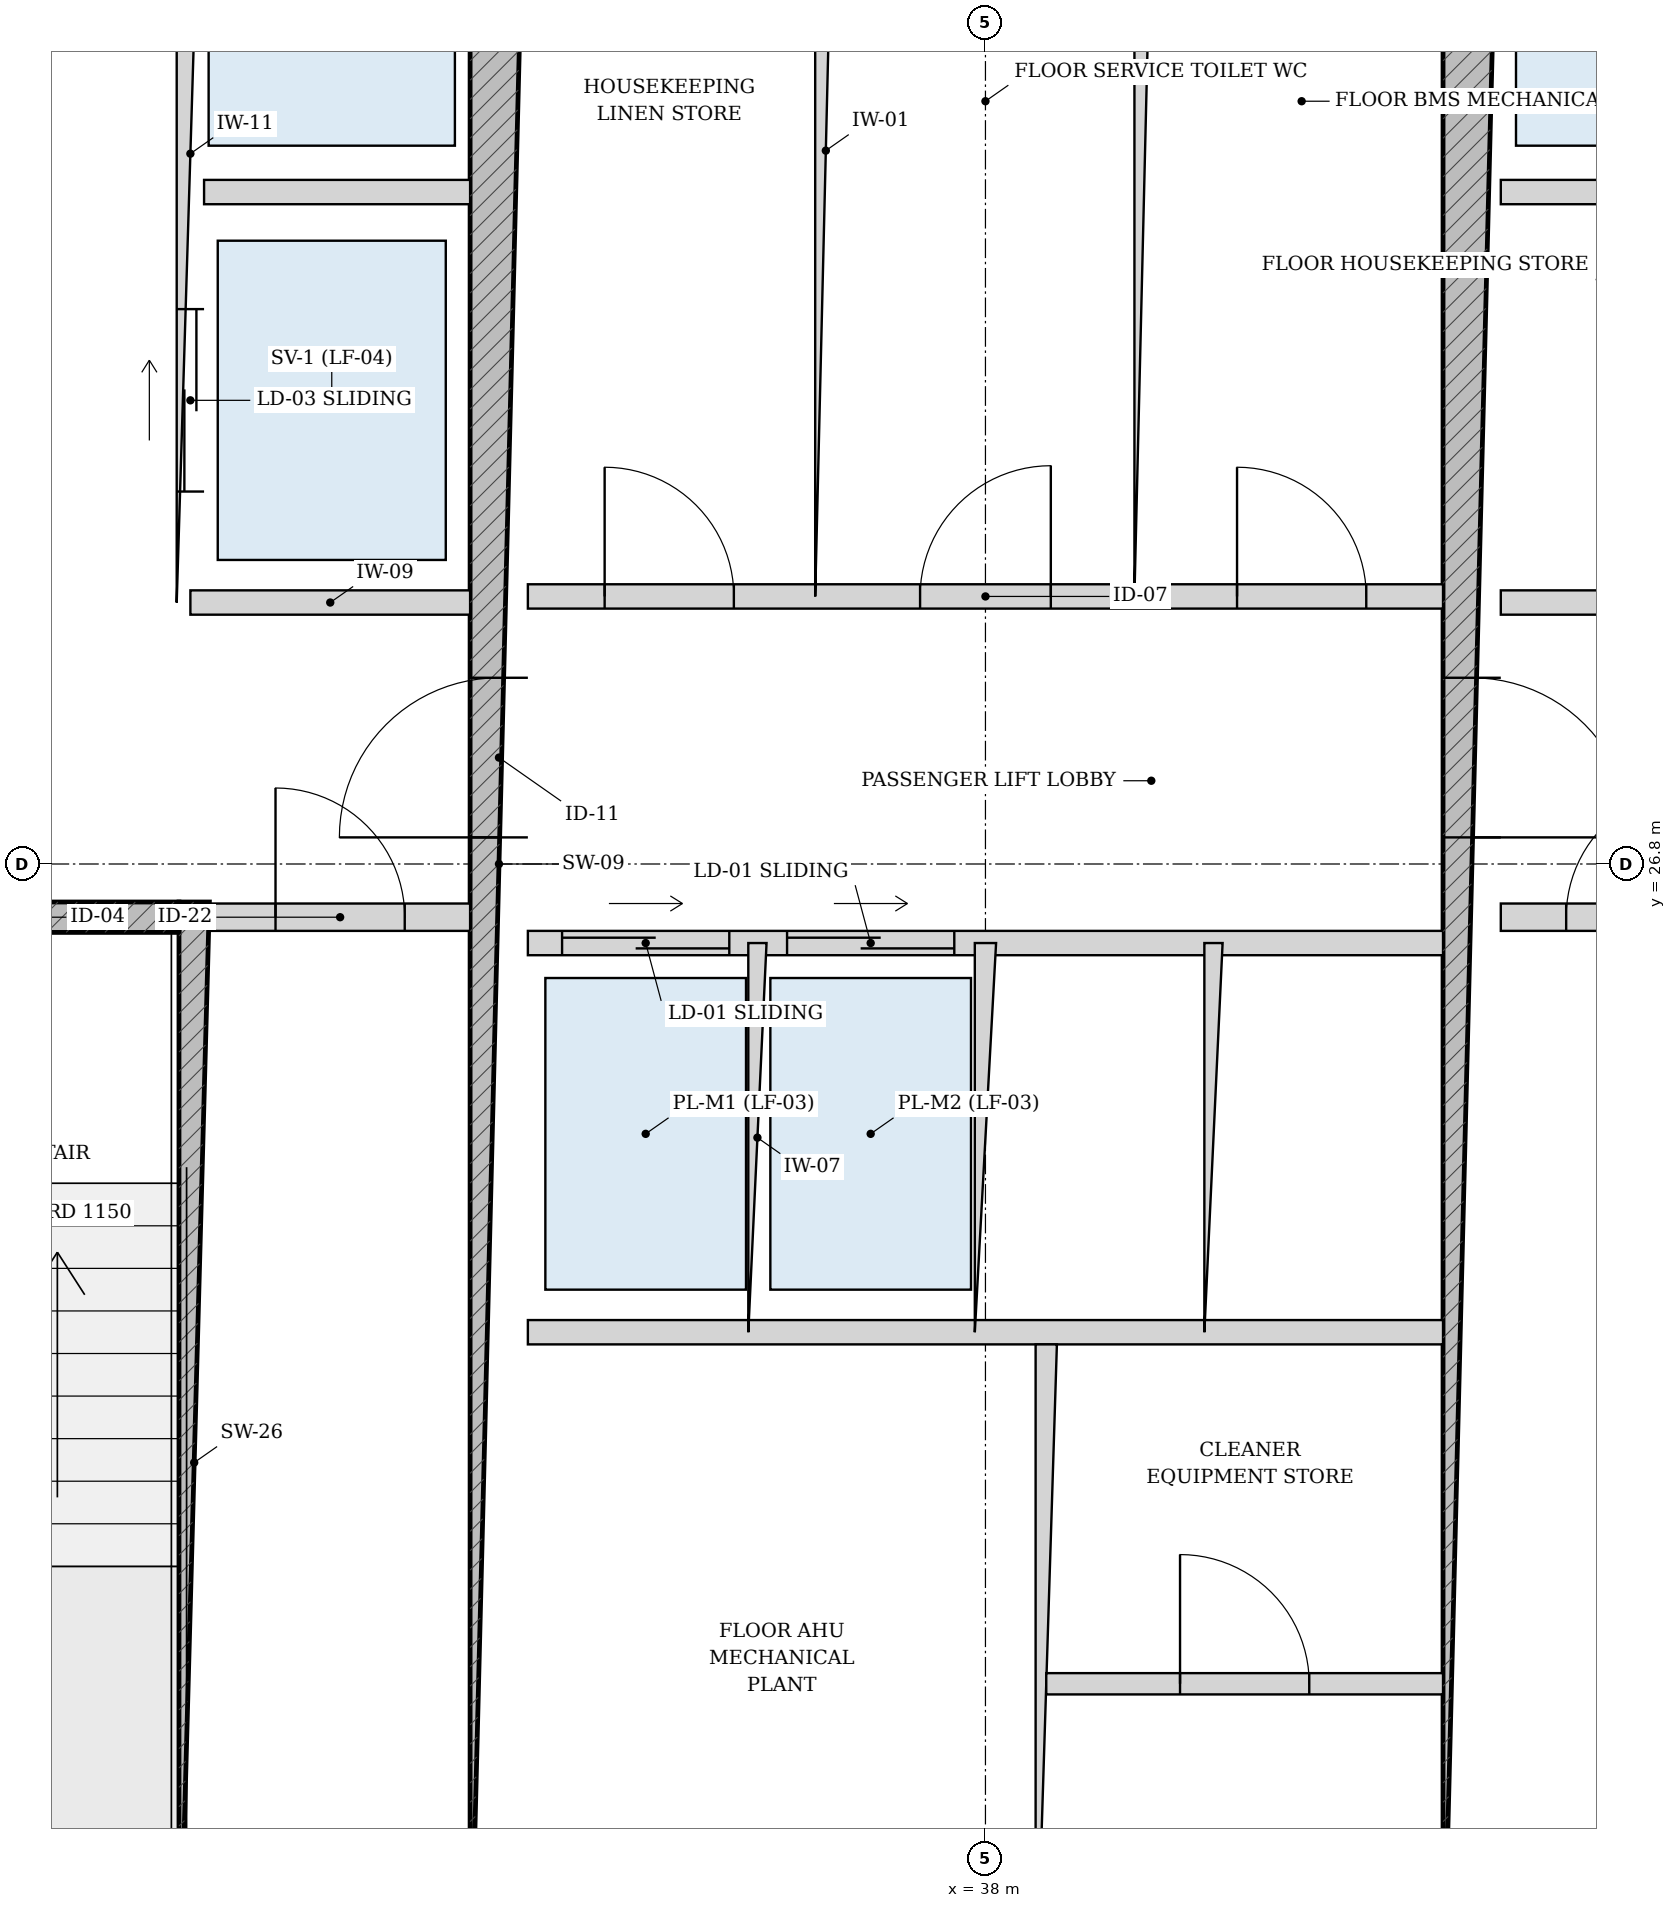
"""IFC4 building model, lengths in metres.
Left out: names, types, materials, properties, quantities, classifications, styles, units other than length and angle.
Written with IfcOpenShell. Run it as: python <this file> out.ifc"""

import sys

from ifc_helpers import new_model, si_unit, direction, frame, frame_2d, origin, place, context, subcontext, project, spatial, rectangle, extrude, source, transform, mapped, element, fill, save


model = new_model("IFC4")
c1 = context("Model", 3, precision=1e-05, world=origin(), true_north=direction((-0.2419218956, 0.970295726276)))
c2 = subcontext(c1, "Body", "Model", "MODEL_VIEW")
j1 = project(units=[si_unit("LENGTHUNIT", "METRE"), si_unit("PLANEANGLEUNIT", "RADIAN")], contexts=[c1])
p1 = place(None, origin())
s1 = spatial("IfcSite", under=j1, at=p1, CompositionType="ELEMENT")
p2 = place(p1, origin())
s2 = spatial("IfcBuilding", under=s1, at=p2, CompositionType="ELEMENT")
p3 = place(p2, frame((0.0, 0.0, 146.2)))
s3 = spatial("IfcBuildingStorey", under=s2, at=p3, CompositionType="ELEMENT", Elevation=146.2)
p4 = place(p3, frame((32.795, 19.175, 0.0), z_axis=(0.0, 0.0, 1.0), x_axis=(0.0, 1.0, 0.0)))
e1 = element("IfcWall", 1, at=p4, inside=s3, PredefinedType="SOLIDWALL", context=c2, shape_type="SweptSolid", body=[
    extrude(rectangle(XDim=7.375, YDim=0.2, at=frame_2d((3.688, 0.0))), origin(), (0.0, 0.0, 1.0), 3.33),
])
p5 = place(p3, frame((29.375, 26.45, 0.0), z_axis=(0.0, 0.0, 1.0), x_axis=(1.0, 0.0, 0.0)))
e2 = element("IfcWall", 2, at=p5, inside=s3, PredefinedType="SOLIDWALL", context=c2, shape_type="SweptSolid", body=[
    extrude(rectangle(XDim=3.32, YDim=0.2, at=frame_2d((1.66, 0.0))), origin(), (0.0, 0.0, 1.0), 3.33),
])
p6 = place(p5, frame((1.185, 0.0, 0.0)))
e3 = element("IfcOpeningElement", 3, at=p6, cuts=e2, PredefinedType="OPENING", context=c2, shape_type="SweptSolid", body=[
    extrude(rectangle(XDim=0.95, YDim=2.15, at=frame_2d((0.475, 1.075))), frame((0.0, 0.11, 0.0), z_axis=(0.0, -1.0, 0.0), x_axis=(1.0, 0.0, 0.0)), (0.0, 0.0, 1.0), 0.22),
])
p7 = place(p3, frame((34.8, 19.175, 0.0), z_axis=(0.0, 0.0, 1.0), x_axis=(0.0, 1.0, 0.0)))
e4 = element("IfcWall", 4, at=p7, inside=s3, PredefinedType="SHEAR", context=c2, shape_type="SweptSolid", body=[
    extrude(rectangle(XDim=15.25, YDim=0.38, at=frame_2d((7.625, 0.0))), origin(), (0.0, 0.0, 1.0), 3.33),
])
p8 = place(p7, frame((7.8, 0.0, 0.0)))
e5 = element("IfcOpeningElement", 5, at=p8, cuts=e4, PredefinedType="OPENING", context=c2, shape_type="SweptSolid", body=[
    extrude(rectangle(XDim=1.05, YDim=2.15, at=frame_2d((0.525, 1.075))), frame((0.0, 0.2, 0.0), z_axis=(0.0, -1.0, 0.0), x_axis=(1.0, 0.0, 0.0)), (0.0, 0.0, 1.0), 0.4),
])
p9 = place(p3, frame((41.2, 19.175, 0.0), z_axis=(0.0, 0.0, 1.0), x_axis=(0.0, 1.0, 0.0)))
e6 = element("IfcWall", 6, at=p9, inside=s3, PredefinedType="SHEAR", context=c2, shape_type="SweptSolid", body=[
    extrude(rectangle(XDim=15.25, YDim=0.38, at=frame_2d((7.625, 0.0))), origin(), (0.0, 0.0, 1.0), 3.33),
])
p10 = place(p9, frame((7.8, 0.0, 0.0)))
e7 = element("IfcOpeningElement", 7, at=p10, cuts=e6, PredefinedType="OPENING", context=c2, shape_type="SweptSolid", body=[
    extrude(rectangle(XDim=1.05, YDim=2.15, at=frame_2d((0.525, 1.075))), frame((0.0, 0.2, 0.0), z_axis=(0.0, -1.0, 0.0), x_axis=(1.0, 0.0, 0.0)), (0.0, 0.0, 1.0), 0.4),
])
p11 = place(p3, frame((32.9, 26.45, 0.0), z_axis=(0.0, 0.0, 1.0), x_axis=(1.0, 0.0, 0.0)))
e8 = element("IfcWall", 8, at=p11, inside=s3, PredefinedType="PARTITIONING", context=c2, shape_type="SweptSolid", body=[
    extrude(rectangle(XDim=1.71, YDim=0.18, at=frame_2d((0.855, 0.0))), origin(), (0.0, 0.0, 1.0), 3.33),
])
p12 = place(p11, frame((0.43, 0.0, 0.0)))
e9 = element("IfcOpeningElement", 9, at=p12, cuts=e8, PredefinedType="OPENING", context=c2, shape_type="SweptSolid", body=[
    extrude(rectangle(XDim=0.85, YDim=2.1, at=frame_2d((0.425, 1.05))), frame((0.0, 0.1, 0.0), z_axis=(0.0, -1.0, 0.0), x_axis=(1.0, 0.0, 0.0)), (0.0, 0.0, 1.0), 0.2),
])
p13 = place(p3, frame((41.39, 26.45, 0.0), z_axis=(0.0, 0.0, 1.0), x_axis=(1.0, 0.0, 0.0)))
e10 = element("IfcWall", 10, at=p13, inside=s3, PredefinedType="PARTITIONING", context=c2, shape_type="SweptSolid", body=[
    extrude(rectangle(XDim=1.71, YDim=0.18, at=frame_2d((0.855, 0.0))), origin(), (0.0, 0.0, 1.0), 3.33),
])
p14 = place(p13, frame((0.43, 0.0, 0.0)))
e11 = element("IfcOpeningElement", 11, at=p14, cuts=e10, PredefinedType="OPENING", context=c2, shape_type="SweptSolid", body=[
    extrude(rectangle(XDim=0.85, YDim=2.1, at=frame_2d((0.425, 1.05))), frame((0.0, 0.1, 0.0), z_axis=(0.0, -1.0, 0.0), x_axis=(1.0, 0.0, 0.0)), (0.0, 0.0, 1.0), 0.2),
])
p15 = place(p3, frame((32.77, 28.52, 0.0), z_axis=(0.0, 0.0, 1.0), x_axis=(0.0, 1.0, 0.0)))
e12 = element("IfcWall", 12, at=p15, inside=s3, PredefinedType="PARTITIONING", context=c2, shape_type="SweptSolid", body=[
    extrude(rectangle(XDim=5.905, YDim=0.18, at=frame_2d((2.953, 0.0))), origin(), (0.0, 0.0, 1.0), 3.33),
])
p16 = place(p15, frame((3.655, 0.0, 0.0)))
e13 = element("IfcOpeningElement", 13, at=p16, cuts=e12, PredefinedType="OPENING", context=c2, shape_type="SweptSolid", body=[
    extrude(rectangle(XDim=1.15, YDim=2.2, at=frame_2d((0.575, 1.1))), frame((0.0, 0.1, 0.0), z_axis=(0.0, -1.0, 0.0), x_axis=(1.0, 0.0, 0.0)), (0.0, 0.0, 1.0), 0.2),
])
p17 = place(p15, frame((0.73, 0.0, 0.0)))
e14 = element("IfcOpeningElement", 14, at=p17, cuts=e12, PredefinedType="OPENING", context=c2, shape_type="SweptSolid", body=[
    extrude(rectangle(XDim=1.2, YDim=2.25, at=frame_2d((0.6, 1.125))), frame((0.0, 0.1, 0.0), z_axis=(0.0, -1.0, 0.0), x_axis=(1.0, 0.0, 0.0)), (0.0, 0.0, 1.0), 0.2),
])
p18 = place(p3, frame((32.86, 31.22, 0.0), z_axis=(0.0, 0.0, 1.0), x_axis=(1.0, 0.0, 0.0)))
e15 = element("IfcWall", 15, at=p18, inside=s3, PredefinedType="PARTITIONING", context=c2, shape_type="SweptSolid", body=[
    extrude(rectangle(XDim=1.75, YDim=0.16, at=frame_2d((0.875, 0.0))), origin(), (0.0, 0.0, 1.0), 3.33),
])
p19 = place(p3, frame((32.77, 28.52, 0.0), z_axis=(0.0, 0.0, 1.0), x_axis=(1.0, 0.0, 0.0)))
e16 = element("IfcWall", 16, at=p19, inside=s3, PredefinedType="PARTITIONING", context=c2, shape_type="SweptSolid", body=[
    extrude(rectangle(XDim=1.84, YDim=0.16, at=frame_2d((0.92, 0.0))), origin(), (0.0, 0.0, 1.0), 3.33),
])
p20 = place(p3, frame((41.39, 31.22, 0.0), z_axis=(0.0, 0.0, 1.0), x_axis=(1.0, 0.0, 0.0)))
e17 = element("IfcWall", 17, at=p20, inside=s3, PredefinedType="PARTITIONING", context=c2, shape_type="SweptSolid", body=[
    extrude(rectangle(XDim=1.75, YDim=0.16, at=frame_2d((0.875, 0.0))), origin(), (0.0, 0.0, 1.0), 3.33),
])
p21 = place(p3, frame((41.39, 28.52, 0.0), z_axis=(0.0, 0.0, 1.0), x_axis=(1.0, 0.0, 0.0)))
e18 = element("IfcWall", 18, at=p21, inside=s3, PredefinedType="PARTITIONING", context=c2, shape_type="SweptSolid", body=[
    extrude(rectangle(XDim=1.84, YDim=0.16, at=frame_2d((0.92, 0.0))), origin(), (0.0, 0.0, 1.0), 3.33),
])
p22 = place(p3, frame((34.99, 28.56, 0.0), z_axis=(0.0, 0.0, 1.0), x_axis=(1.0, 0.0, 0.0)))
e19 = element("IfcWall", 19, at=p22, inside=s3, PredefinedType="PARTITIONING", context=c2, shape_type="SweptSolid", body=[
    extrude(rectangle(XDim=6.02, YDim=0.16, at=frame_2d((3.01, 0.0))), origin(), (0.0, 0.0, 1.0), 3.33),
])
p23 = place(p22, frame((0.505, 0.0, 0.0)))
e20 = element("IfcOpeningElement", 20, at=p23, cuts=e19, PredefinedType="OPENING", context=c2, shape_type="SweptSolid", body=[
    extrude(rectangle(XDim=0.85, YDim=2.1, at=frame_2d((0.425, 1.05))), frame((0.0, 0.09, 0.0), z_axis=(0.0, -1.0, 0.0), x_axis=(1.0, 0.0, 0.0)), (0.0, 0.0, 1.0), 0.18),
])
p24 = place(p22, frame((2.58, 0.0, 0.0)))
e21 = element("IfcOpeningElement", 21, at=p24, cuts=e19, PredefinedType="OPENING", context=c2, shape_type="SweptSolid", body=[
    extrude(rectangle(XDim=0.86, YDim=2.1, at=frame_2d((0.43, 1.05))), frame((0.0, 0.09, 0.0), z_axis=(0.0, -1.0, 0.0), x_axis=(1.0, 0.0, 0.0)), (0.0, 0.0, 1.0), 0.18),
])
p25 = place(p22, frame((4.665, 0.0, 0.0)))
e22 = element("IfcOpeningElement", 22, at=p25, cuts=e19, PredefinedType="OPENING", context=c2, shape_type="SweptSolid", body=[
    extrude(rectangle(XDim=0.85, YDim=2.1, at=frame_2d((0.425, 1.05))), frame((0.0, 0.09, 0.0), z_axis=(0.0, -1.0, 0.0), x_axis=(1.0, 0.0, 0.0)), (0.0, 0.0, 1.0), 0.18),
])
for number, where, z_axis, x_axis in (
    (23, (36.95, 28.56, 0.0), (0.0, 0.0, 1.0), (0.0, 1.0, 0.0)),
    (24, (39.05, 28.56, 0.0), (0.0, 0.0, 1.0), (0.0, 1.0, 0.0)),
):
    element("IfcWall", number, at=place(p3, frame(where, z_axis=z_axis, x_axis=x_axis)), inside=s3, PredefinedType="PARTITIONING", context=c2, shape_type="SweptSolid", body=[
        extrude(rectangle(XDim=5.865, YDim=0.14, at=frame_2d((2.933, 0.0))), origin(), (0.0, 0.0, 1.0), 3.33),
    ])
p26 = place(p3, frame((34.99, 26.28, 0.0), z_axis=(0.0, 0.0, 1.0), x_axis=(1.0, 0.0, 0.0)))
e25 = element("IfcWall", 25, at=p26, inside=s3, PredefinedType="PARTITIONING", context=c2, shape_type="SweptSolid", body=[
    extrude(rectangle(XDim=6.02, YDim=0.16, at=frame_2d((3.01, 0.0))), origin(), (0.0, 0.0, 1.0), 3.33),
])
p27 = place(p26, frame((0.225, 0.0, 0.0)))
e26 = element("IfcOpeningElement", 26, at=p27, cuts=e25, PredefinedType="OPENING", context=c2, shape_type="SweptSolid", body=[
    extrude(rectangle(XDim=1.1, YDim=2.2, at=frame_2d((0.55, 1.1))), frame((0.0, 0.09, 0.0), z_axis=(0.0, -1.0, 0.0), x_axis=(1.0, 0.0, 0.0)), (0.0, 0.0, 1.0), 0.18),
])
p28 = place(p26, frame((1.705, 0.0, 0.0)))
e27 = element("IfcOpeningElement", 27, at=p28, cuts=e25, PredefinedType="OPENING", context=c2, shape_type="SweptSolid", body=[
    extrude(rectangle(XDim=1.1, YDim=2.2, at=frame_2d((0.55, 1.1))), frame((0.0, 0.09, 0.0), z_axis=(0.0, -1.0, 0.0), x_axis=(1.0, 0.0, 0.0)), (0.0, 0.0, 1.0), 0.18),
])
p29 = place(p3, frame((34.99, 23.72, 0.0), z_axis=(0.0, 0.0, 1.0), x_axis=(1.0, 0.0, 0.0)))
e28 = element("IfcWall", 28, at=p29, inside=s3, PredefinedType="PARTITIONING", context=c2, shape_type="SweptSolid", body=[
    extrude(rectangle(XDim=6.02, YDim=0.16, at=frame_2d((3.01, 0.0))), origin(), (0.0, 0.0, 1.0), 3.33),
])
p30 = place(p3, frame((36.5, 23.72, 0.0), z_axis=(0.0, 0.0, 1.0), x_axis=(0.0, 1.0, 0.0)))
e29 = element("IfcWall", 29, at=p30, inside=s3, PredefinedType="PARTITIONING", context=c2, shape_type="SweptSolid", body=[
    extrude(rectangle(XDim=2.56, YDim=0.12, at=frame_2d((1.28, 0.0))), origin(), (0.0, 0.0, 1.0), 3.33),
])
p31 = place(p3, frame((38.0, 23.72, 0.0), z_axis=(0.0, 0.0, 1.0), x_axis=(0.0, 1.0, 0.0)))
e30 = element("IfcWall", 30, at=p31, inside=s3, PredefinedType="PARTITIONING", context=c2, shape_type="SweptSolid", body=[
    extrude(rectangle(XDim=2.56, YDim=0.14, at=frame_2d((1.28, 0.0))), origin(), (0.0, 0.0, 1.0), 3.33),
])
p32 = place(p3, frame((39.5, 23.72, 0.0), z_axis=(0.0, 0.0, 1.0), x_axis=(0.0, 1.0, 0.0)))
e31 = element("IfcWall", 31, at=p32, inside=s3, PredefinedType="PARTITIONING", context=c2, shape_type="SweptSolid", body=[
    extrude(rectangle(XDim=2.56, YDim=0.12, at=frame_2d((1.28, 0.0))), origin(), (0.0, 0.0, 1.0), 3.33),
])
p33 = place(p3, frame((38.4, 19.175, 0.0), z_axis=(0.0, 0.0, 1.0), x_axis=(0.0, 1.0, 0.0)))
e32 = element("IfcWall", 32, at=p33, inside=s3, PredefinedType="PARTITIONING", context=c2, shape_type="SweptSolid", body=[
    extrude(rectangle(XDim=4.465, YDim=0.14, at=frame_2d((2.232, 0.0))), origin(), (0.0, 0.0, 1.0), 3.33),
])
p34 = place(p3, frame((38.4, 21.407, 0.0), z_axis=(0.0, 0.0, 1.0), x_axis=(1.0, 0.0, 0.0)))
e33 = element("IfcWall", 33, at=p34, inside=s3, PredefinedType="PARTITIONING", context=c2, shape_type="SweptSolid", body=[
    extrude(rectangle(XDim=2.61, YDim=0.14, at=frame_2d((1.305, 0.0))), origin(), (0.0, 0.0, 1.0), 3.33),
])
p35 = place(p34, frame((0.88, 0.0, 0.0)))
e34 = element("IfcOpeningElement", 34, at=p35, cuts=e33, PredefinedType="OPENING", context=c2, shape_type="SweptSolid", body=[
    extrude(rectangle(XDim=0.85, YDim=2.1, at=frame_2d((0.425, 1.05))), frame((0.0, 0.08, 0.0), z_axis=(0.0, -1.0, 0.0), x_axis=(1.0, 0.0, 0.0)), (0.0, 0.0, 1.0), 0.16),
])
m1 = source(origin(), c2, "Body", "SweptSolid", [
    extrude(rectangle(XDim=1.05, YDim=2.15, at=frame_2d((0.525, 1.075))), frame((0.0, 0.025, 0.0), z_axis=(0.0, -1.0, 0.0), x_axis=(1.0, 0.0, 0.0)), (0.0, 0.0, 1.0), 0.05),
])
p36 = place(p8, origin())
e35 = element("IfcDoor", 35, at=p36, inside=s3, OperationType="SINGLE_SWING_LEFT", PredefinedType="DOOR", context=c2, shape_type="MappedRepresentation", body=[
    mapped(m1, transform((0.0, 0.0, 0.0), scale=1.0)),
])
fill(e5, e35)
p37 = place(p10, frame((1.05, 0.0, 0.0), z_axis=(0.0, 0.0, 1.0), x_axis=(-1.0, 0.0, 0.0)))
e36 = element("IfcDoor", 36, at=p37, inside=s3, OperationType="SINGLE_SWING_RIGHT", PredefinedType="DOOR", context=c2, shape_type="MappedRepresentation", body=[
    mapped(m1, transform((0.0, 0.0, 0.0), scale=1.0)),
])
fill(e7, e36)
m2 = source(origin(), c2, "Body", "SweptSolid", [
    extrude(rectangle(XDim=0.85, YDim=2.1, at=frame_2d((0.425, 1.05))), frame((0.0, 0.025, 0.0), z_axis=(0.0, -1.0, 0.0), x_axis=(1.0, 0.0, 0.0)), (0.0, 0.0, 1.0), 0.05),
])
p38 = place(p12, origin())
e37 = element("IfcDoor", 37, at=p38, inside=s3, OperationType="SINGLE_SWING_LEFT", PredefinedType="DOOR", context=c2, shape_type="MappedRepresentation", body=[
    mapped(m2, transform((0.0, 0.0, 0.0), scale=1.0)),
])
fill(e9, e37)
p39 = place(p14, origin())
e38 = element("IfcDoor", 38, at=p39, inside=s3, OperationType="SINGLE_SWING_RIGHT", PredefinedType="DOOR", context=c2, shape_type="MappedRepresentation", body=[
    mapped(m2, transform((0.0, 0.0, 0.0), scale=1.0)),
])
fill(e11, e38)
p40 = place(p23, origin())
e39 = element("IfcDoor", 39, at=p40, inside=s3, OperationType="SINGLE_SWING_LEFT", PredefinedType="DOOR", context=c2, shape_type="MappedRepresentation", body=[
    mapped(m2, transform((0.0, 0.0, 0.0), scale=1.0)),
])
fill(e20, e39)
m3 = source(origin(), c2, "Body", "SweptSolid", [
    extrude(rectangle(XDim=0.86, YDim=2.1, at=frame_2d((0.43, 1.05))), frame((0.0, 0.025, 0.0), z_axis=(0.0, -1.0, 0.0), x_axis=(1.0, 0.0, 0.0)), (0.0, 0.0, 1.0), 0.05),
])
p41 = place(p24, origin())
e40 = element("IfcDoor", 40, at=p41, inside=s3, OperationType="SINGLE_SWING_RIGHT", PredefinedType="DOOR", context=c2, shape_type="MappedRepresentation", body=[
    mapped(m3, transform((0.0, 0.0, 0.0), scale=1.0)),
])
fill(e21, e40)
p42 = place(p25, origin())
e41 = element("IfcDoor", 41, at=p42, inside=s3, OperationType="SINGLE_SWING_LEFT", PredefinedType="DOOR", context=c2, shape_type="MappedRepresentation", body=[
    mapped(m2, transform((0.0, 0.0, 0.0), scale=1.0)),
])
fill(e22, e41)
p43 = place(p35, origin())
e42 = element("IfcDoor", 42, at=p43, inside=s3, OperationType="SINGLE_SWING_LEFT", PredefinedType="DOOR", context=c2, shape_type="MappedRepresentation", body=[
    mapped(m2, transform((0.0, 0.0, 0.0), scale=1.0)),
])
fill(e34, e42)
m4 = source(origin(), c2, "Body", "SweptSolid", [
    extrude(rectangle(XDim=1.2, YDim=2.25, at=frame_2d((0.6, 1.125))), frame((0.0, 0.025, 0.0), z_axis=(0.0, -1.0, 0.0), x_axis=(1.0, 0.0, 0.0)), (0.0, 0.0, 1.0), 0.05),
])
p44 = place(p17, origin())
e43 = element("IfcDoor", 43, at=p44, inside=s3, OperationType="DOUBLE_DOOR_SLIDING", PredefinedType="DOOR", context=c2, shape_type="MappedRepresentation", body=[
    mapped(m4, transform((0.0, 0.0, 0.0), scale=1.0)),
])
fill(e14, e43)
m5 = source(origin(), c2, "Body", "SweptSolid", [
    extrude(rectangle(XDim=1.1, YDim=2.2, at=frame_2d((0.55, 1.1))), frame((0.0, 0.025, 0.0), z_axis=(0.0, -1.0, 0.0), x_axis=(1.0, 0.0, 0.0)), (0.0, 0.0, 1.0), 0.05),
])
p45 = place(p27, origin())
e44 = element("IfcDoor", 44, at=p45, inside=s3, OperationType="DOUBLE_DOOR_SLIDING", PredefinedType="DOOR", context=c2, shape_type="MappedRepresentation", body=[
    mapped(m5, transform((0.0, 0.0, 0.0), scale=1.0)),
])
fill(e26, e44)
p46 = place(p28, origin())
e45 = element("IfcDoor", 45, at=p46, inside=s3, OperationType="DOUBLE_DOOR_SLIDING", PredefinedType="DOOR", context=c2, shape_type="MappedRepresentation", body=[
    mapped(m5, transform((0.0, 0.0, 0.0), scale=1.0)),
])
fill(e27, e45)
save(model, sys.argv[1])
